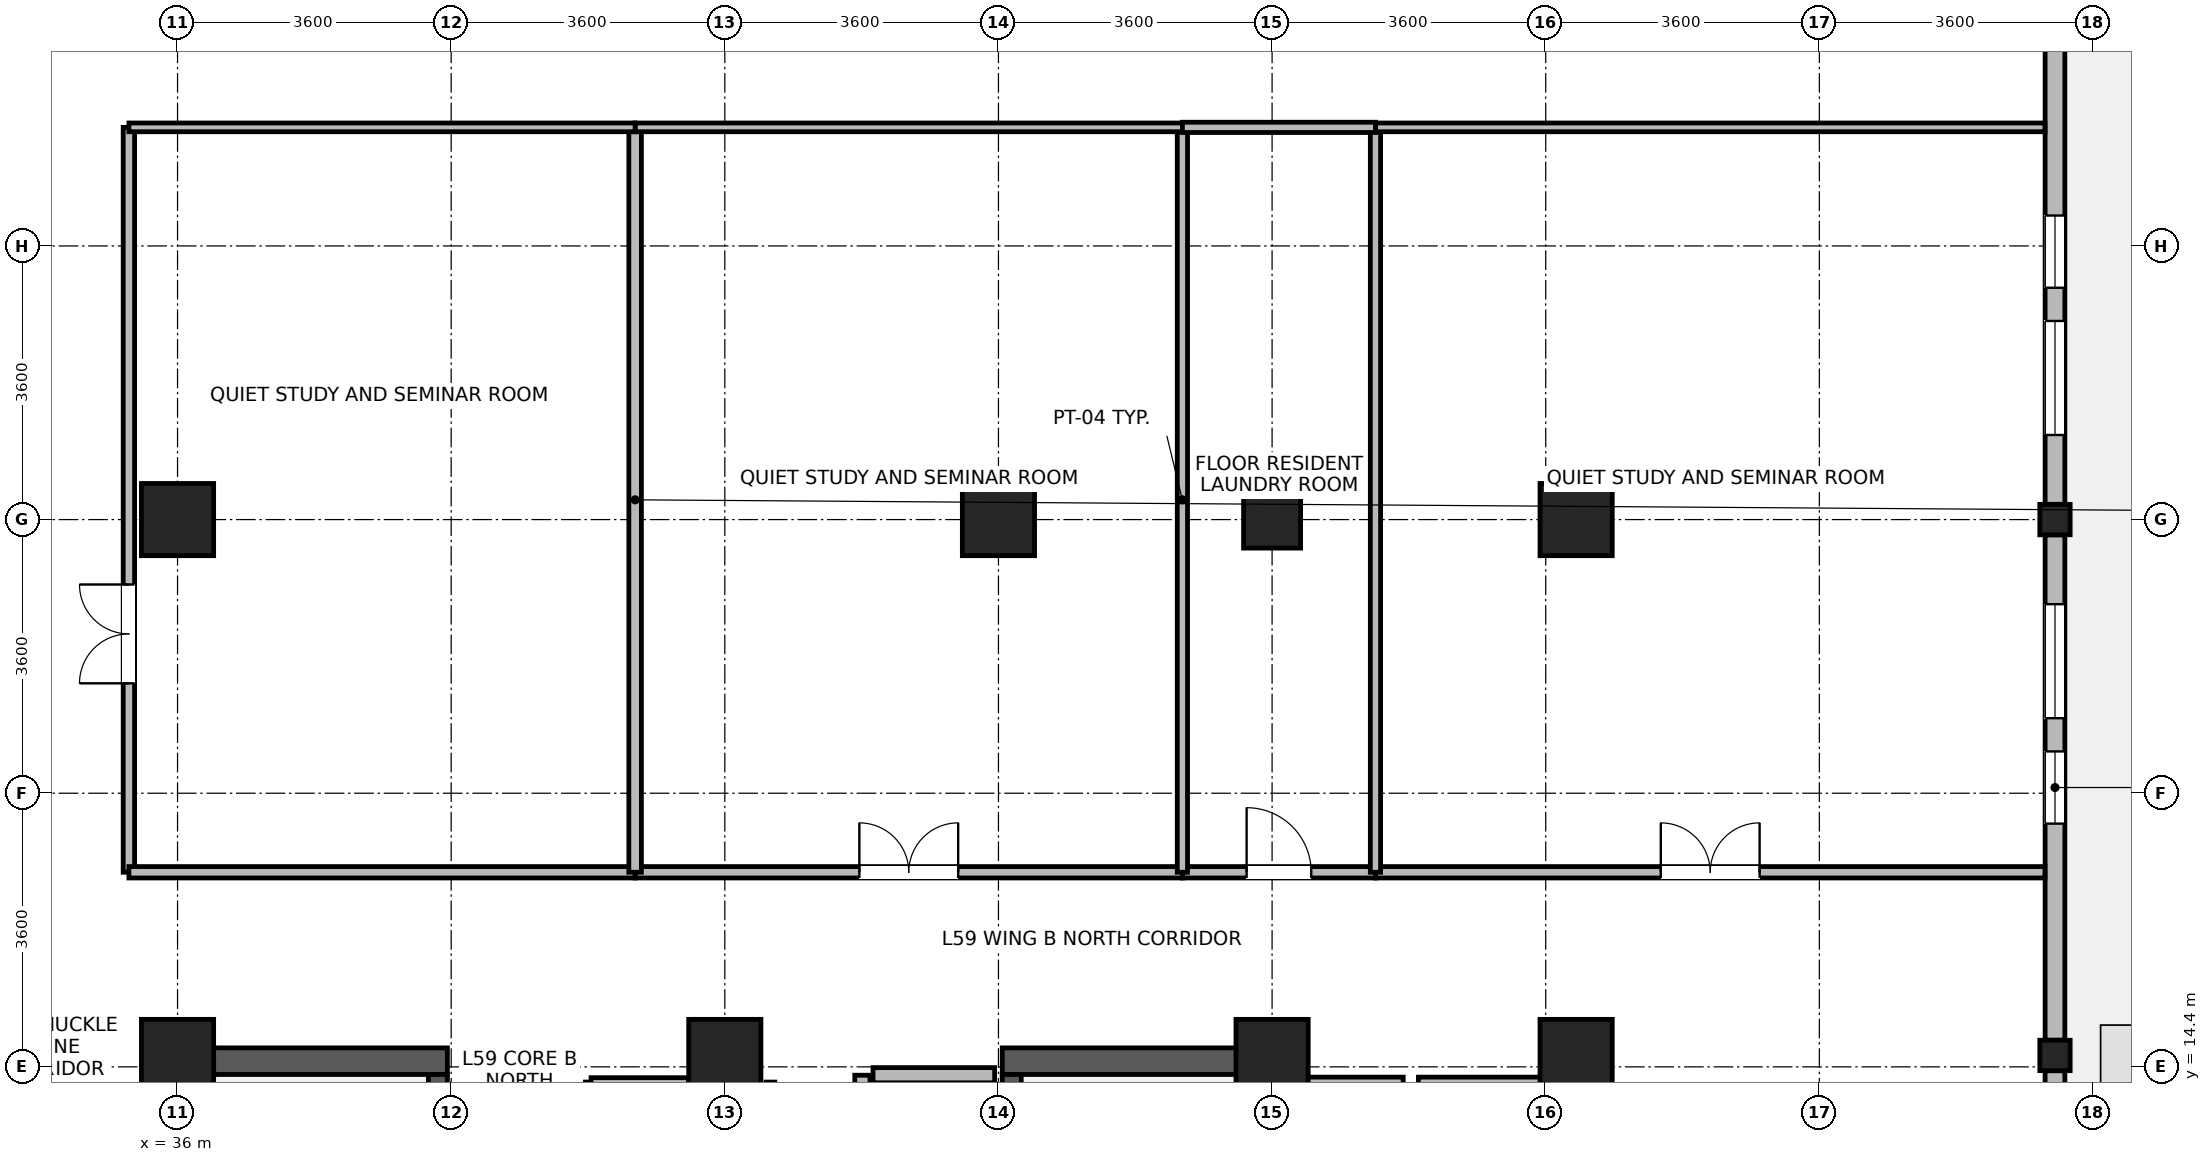
"""IFC4 building model, lengths in metres.
Left out: names, types, materials, properties, quantities, classifications, styles, units other than length and angle.
Written with IfcOpenShell. Run it as: python <this file> out.ifc"""

import sys

from ifc_helpers import new_model, si_unit, direction, frame, frame_2d, origin, origin_2d, place, context, subcontext, project, spatial, rectangle, i_section, extrude, source, transform, mapped, element, fill, save


model = new_model("IFC4")
c1 = context("Model", 3, precision=1e-05, world=origin(), true_north=direction((0.0, 1.0)))
c2 = subcontext(c1, "Body", "Model", "MODEL_VIEW")
j1 = project(units=[si_unit("LENGTHUNIT", "METRE"), si_unit("PLANEANGLEUNIT", "RADIAN")], contexts=[c1])
p1 = place(None, origin())
s1 = spatial("IfcSite", under=j1, at=p1, CompositionType="ELEMENT")
p2 = place(p1, origin())
s2 = spatial("IfcBuilding", under=s1, at=p2, CompositionType="ELEMENT")
p3 = place(p2, frame((0.0, 0.0, 231.4)))
s3 = spatial("IfcBuildingStorey", under=s2, at=p3, CompositionType="ELEMENT", Elevation=231.4)
for number, where, z_axis, x_axis in (
    (1, (36.175, 6.95, 0.0), (0.0, 0.0, 1.0), (0.0, 1.0, 0.0)),
    (2, (50.225, 6.95, 0.0), (0.0, 0.0, 1.0), (0.0, 1.0, 0.0)),
):
    element("IfcWall", number, at=place(p3, frame(where, z_axis=z_axis, x_axis=x_axis)), inside=s3, PredefinedType="SHEAR", context=c2, shape_type="SweptSolid", body=[
        extrude(rectangle(XDim=7.7, YDim=0.35, at=frame_2d((3.85, 0.0))), origin(), (0.0, 0.0, 1.0), 3.44),
    ])
for number, where, z_axis, x_axis in (
    (3, (36.35, 14.475, 0.0), (0.0, 0.0, 1.0), (1.0, 0.0, 0.0)),
    (4, (46.85, 14.475, 0.0), (0.0, 0.0, 1.0), (1.0, 0.0, 0.0)),
):
    element("IfcWall", number, at=place(p3, frame(where, z_axis=z_axis, x_axis=x_axis)), inside=s3, PredefinedType="SHEAR", context=c2, shape_type="SweptSolid", body=[
        extrude(rectangle(XDim=3.2, YDim=0.35, at=frame_2d((1.6, 0.0))), origin(), (0.0, 0.0, 1.0), 3.44),
    ])
p4 = place(p3, frame((39.425, 7.3, 0.0), z_axis=(0.0, 0.0, 1.0), x_axis=(0.0, 1.0, 0.0)))
e5 = element("IfcWall", 5, at=p4, inside=s3, PredefinedType="SHEAR", context=c2, shape_type="SweptSolid", body=[
    extrude(rectangle(XDim=7.0, YDim=0.25, at=frame_2d((3.5, 0.0))), origin(), (0.0, 0.0, 1.0), 3.44),
])
p5 = place(p4, frame((0.15, 0.0, 0.0)))
e6 = element("IfcOpeningElement", 6, at=p5, cuts=e5, PredefinedType="OPENING", context=c2, shape_type="SweptSolid", body=[
    extrude(rectangle(XDim=1.1, YDim=2.08, at=frame_2d((0.55, 1.04))), frame((0.0, 0.135, 0.0), z_axis=(0.0, -1.0, 0.0), x_axis=(1.0, 0.0, 0.0)), (0.0, 0.0, 1.0), 0.27),
])
p6 = place(p3, frame((46.975, 7.3, 0.0), z_axis=(0.0, 0.0, 1.0), x_axis=(0.0, 1.0, 0.0)))
e7 = element("IfcWall", 7, at=p6, inside=s3, PredefinedType="SHEAR", context=c2, shape_type="SweptSolid", body=[
    extrude(rectangle(XDim=7.0, YDim=0.25, at=frame_2d((3.5, 0.0))), origin(), (0.0, 0.0, 1.0), 3.44),
])
p7 = place(p6, frame((0.15, 0.0, 0.0)))
e8 = element("IfcOpeningElement", 8, at=p7, cuts=e7, PredefinedType="OPENING", context=c2, shape_type="SweptSolid", body=[
    extrude(rectangle(XDim=1.1, YDim=2.08, at=frame_2d((0.55, 1.04))), frame((0.0, 0.135, 0.0), z_axis=(0.0, -1.0, 0.0), x_axis=(1.0, 0.0, 0.0)), (0.0, 0.0, 1.0), 0.27),
])
m1 = source(origin(), c2, "Body", "SweptSolid", [
    extrude(rectangle(XDim=0.95, YDim=0.95, at=origin_2d()), origin(), (0.0, 0.0, 1.0), 3.7),
])
for number, where, z_axis, x_axis in (
    (9, (36.0, 21.6, 0.0), (0.0, 0.0, 1.0), (1.0, 0.0, 0.0)),
    (10, (46.8, 21.6, 0.0), (0.0, 0.0, 1.0), (1.0, 0.0, 0.0)),
    (11, (36.0, 14.55, 0.0), (0.0, 0.0, 1.0), (1.0, 0.0, 0.0)),
    (12, (43.2, 14.55, 0.0), (0.0, 0.0, 1.0), (1.0, 0.0, 0.0)),
    (13, (50.4, 14.55, 0.0), (0.0, 0.0, 1.0), (1.0, 0.0, 0.0)),
):
    element("IfcColumn", number, at=place(p3, frame(where, z_axis=z_axis, x_axis=x_axis)), inside=s3, PredefinedType="COLUMN", context=c2, shape_type="MappedRepresentation", body=[
        mapped(m1, transform((0.0, 0.0, 0.0), x_axis=(1.0, 0.0, 0.0), y_axis=(0.0, 1.0, 0.0), z_axis=(0.0, 0.0, 1.0), scale=1.0)),
    ])
m2 = source(origin(), c2, "Body", "SweptSolid", [
    extrude(rectangle(XDim=0.75, YDim=0.75, at=origin_2d()), origin(), (0.0, 0.0, 1.0), 3.7),
])
p8 = place(p3, frame((50.4, 21.6, 0.0), z_axis=(0.0, 0.0, 1.0), x_axis=(1.0, 0.0, 0.0)))
e14 = element("IfcColumn", 14, at=p8, inside=s3, PredefinedType="PILASTER", context=c2, shape_type="MappedRepresentation", body=[
    mapped(m2, transform((0.0, 0.0, 0.0), x_axis=(1.0, 0.0, 0.0), y_axis=(0.0, 1.0, 0.0), z_axis=(0.0, 0.0, 1.0), scale=1.0)),
])
for number, where, z_axis, x_axis in (
    (15, (54.4, 14.55, 0.0), (0.0, 0.0, 1.0), (1.0, 0.0, 0.0)),
    (16, (54.4, 21.6, 0.0), (0.0, 0.0, 1.0), (1.0, 0.0, 0.0)),
):
    element("IfcColumn", number, at=place(p3, frame(where, z_axis=z_axis, x_axis=x_axis)), inside=s3, PredefinedType="COLUMN", context=c2, shape_type="MappedRepresentation", body=[
        mapped(m1, transform((0.0, 0.0, 0.0), x_axis=(1.0, 0.0, 0.0), y_axis=(0.0, 1.0, 0.0), z_axis=(0.0, 0.0, 1.0), scale=1.0)),
    ])
m3 = source(origin(), c2, "Body", "SweptSolid", [
    extrude(i_section(OverallWidth=0.399, OverallDepth=0.4, WebThickness=0.017, FlangeThickness=0.023, FilletRadius=0.015, at=origin_2d()), origin(), (0.0, 0.0, 1.0), 3.7),
])
for number, where, z_axis, x_axis in (
    (17, (60.7, 14.55, 0.0), (0.0, 0.0, 1.0), (1.0, 0.0, 0.0)),
    (18, (60.7, 21.6, 0.0), (0.0, 0.0, 1.0), (1.0, 0.0, 0.0)),
):
    element("IfcColumn", number, at=place(p3, frame(where, z_axis=z_axis, x_axis=x_axis)), inside=s3, PredefinedType="COLUMN", context=c2, shape_type="MappedRepresentation", body=[
        mapped(m3, transform((0.0, 0.0, 0.0), x_axis=(1.0, 0.0, 0.0), y_axis=(0.0, 1.0, 0.0), z_axis=(0.0, 0.0, 1.0), scale=1.0)),
    ])
p9 = place(p3, frame((60.7, 14.349, 0.0), z_axis=(0.0, 0.0, 1.0), x_axis=(0.0, -1.0, 0.0)))
e19 = element("IfcWall", 19, at=p9, inside=s3, PredefinedType="STANDARD", context=c2, shape_type="SweptSolid", body=[
    extrude(rectangle(XDim=5.079, YDim=0.26, at=frame_2d((2.54, 0.0))), origin(), (0.0, 0.0, 1.0), 3.02),
])
p10 = place(p9, frame((1.79, 0.0, 0.0)))
e20 = element("IfcOpeningElement", 20, at=p10, cuts=e19, PredefinedType="OPENING", context=c2, shape_type="SweptSolid", body=[
    extrude(rectangle(XDim=1.5, YDim=2.15, at=frame_2d((0.75, 1.075))), frame((0.0, 0.14, 0.0), z_axis=(0.0, -1.0, 0.0), x_axis=(1.0, 0.0, 0.0)), (0.0, 0.0, 1.0), 0.28),
])
p11 = place(p3, frame((60.7, 21.399, 0.0), z_axis=(0.0, 0.0, 1.0), x_axis=(0.0, -1.0, 0.0)))
e21 = element("IfcWall", 21, at=p11, inside=s3, PredefinedType="STANDARD", context=c2, shape_type="SweptSolid", body=[
    extrude(rectangle(XDim=6.648, YDim=0.26, at=frame_2d((3.324, 0.0))), origin(), (0.0, 0.0, 1.0), 3.02),
])
p12 = place(p11, frame((0.912, 0.0, 0.85)))
e22 = element("IfcOpeningElement", 22, at=p12, cuts=e21, PredefinedType="OPENING", context=c2, shape_type="SweptSolid", body=[
    extrude(rectangle(XDim=1.5, YDim=1.85, at=frame_2d((0.75, 0.925))), frame((0.0, 0.14, 0.0), z_axis=(0.0, -1.0, 0.0), x_axis=(1.0, 0.0, 0.0)), (0.0, 0.0, 1.0), 0.28),
])
p13 = place(p11, frame((2.849, 0.0, 0.85)))
e23 = element("IfcOpeningElement", 23, at=p13, cuts=e21, PredefinedType="OPENING", context=c2, shape_type="SweptSolid", body=[
    extrude(rectangle(XDim=0.95, YDim=1.75, at=frame_2d((0.475, 0.875))), frame((0.0, 0.14, 0.0), z_axis=(0.0, -1.0, 0.0), x_axis=(1.0, 0.0, 0.0)), (0.0, 0.0, 1.0), 0.28),
])
p14 = place(p3, frame((60.7, 28.449, 0.0), z_axis=(0.0, 0.0, 1.0), x_axis=(0.0, -1.0, 0.0)))
e24 = element("IfcWall", 24, at=p14, inside=s3, PredefinedType="STANDARD", context=c2, shape_type="SweptSolid", body=[
    extrude(rectangle(XDim=6.648, YDim=0.26, at=frame_2d((3.324, 0.0))), origin(), (0.0, 0.0, 1.0), 3.02),
])
p15 = place(p14, frame((4.236, 0.0, 0.85)))
e25 = element("IfcOpeningElement", 25, at=p15, cuts=e24, PredefinedType="OPENING", context=c2, shape_type="SweptSolid", body=[
    extrude(rectangle(XDim=1.5, YDim=1.85, at=frame_2d((0.75, 0.925))), frame((0.0, 0.14, 0.0), z_axis=(0.0, -1.0, 0.0), x_axis=(1.0, 0.0, 0.0)), (0.0, 0.0, 1.0), 0.28),
])
p16 = place(p14, frame((2.849, 0.0, 0.85)))
e26 = element("IfcOpeningElement", 26, at=p16, cuts=e24, PredefinedType="OPENING", context=c2, shape_type="SweptSolid", body=[
    extrude(rectangle(XDim=0.95, YDim=1.75, at=frame_2d((0.475, 0.875))), frame((0.0, 0.14, 0.0), z_axis=(0.0, -1.0, 0.0), x_axis=(1.0, 0.0, 0.0)), (0.0, 0.0, 1.0), 0.28),
])
p17 = place(p3, frame((50.475, 14.165, 0.0), z_axis=(0.0, 0.0, 1.0), x_axis=(1.0, 0.0, 0.0)))
e27 = element("IfcWall", 27, at=p17, inside=s3, PredefinedType="PARTITIONING", context=c2, shape_type="SweptSolid", body=[
    extrude(rectangle(XDim=1.65, YDim=0.2, at=frame_2d((0.825, 0.0))), origin(), (0.0, 0.0, 1.0), 3.42),
])
p18 = place(p3, frame((52.325, 14.165, 0.0), z_axis=(0.0, 0.0, 1.0), x_axis=(1.0, 0.0, 0.0)))
e28 = element("IfcWall", 28, at=p18, inside=s3, PredefinedType="PARTITIONING", context=c2, shape_type="SweptSolid", body=[
    extrude(rectangle(XDim=1.65, YDim=0.2, at=frame_2d((0.825, 0.0))), origin(), (0.0, 0.0, 1.0), 3.42),
])
p19 = place(p3, frame((45.15, 14.29, 0.0), z_axis=(0.0, 0.0, 1.0), x_axis=(1.0, 0.0, 0.0)))
e29 = element("IfcWall", 29, at=p19, inside=s3, PredefinedType="PARTITIONING", context=c2, shape_type="SweptSolid", body=[
    extrude(rectangle(XDim=1.6, YDim=0.2, at=frame_2d((0.8, 0.0))), origin(), (0.0, 0.0, 1.0), 2.52),
])
p20 = place(p3, frame((45.01, 11.61, 0.0), z_axis=(0.0, 0.0, 1.0), x_axis=(0.0, 1.0, 0.0)))
e30 = element("IfcWall", 30, at=p20, inside=s3, PredefinedType="PARTITIONING", context=c2, shape_type="SweptSolid", body=[
    extrude(rectangle(XDim=2.68, YDim=0.2, at=frame_2d((1.34, 0.0))), origin(), (0.0, 0.0, 1.0), 3.42),
])
p21 = place(p3, frame((35.36, 16.96, 0.0), z_axis=(0.0, 0.0, 1.0), x_axis=(0.0, 1.0, 0.0)))
e31 = element("IfcWall", 31, at=p21, inside=s3, PredefinedType="PARTITIONING", context=c2, shape_type="SweptSolid", body=[
    extrude(rectangle(XDim=9.8, YDim=0.15, at=frame_2d((4.9, 0.0))), origin(), (0.0, 0.0, 1.0), 3.42),
])
p22 = place(p21, frame((2.486, 0.0, 0.0)))
e32 = element("IfcOpeningElement", 32, at=p22, cuts=e31, PredefinedType="OPENING", context=c2, shape_type="SweptSolid", body=[
    extrude(rectangle(XDim=1.3, YDim=2.12, at=frame_2d((0.65, 1.06))), frame((0.0, 0.085, 0.0), z_axis=(0.0, -1.0, 0.0), x_axis=(1.0, 0.0, 0.0)), (0.0, 0.0, 1.0), 0.17),
])
p23 = place(p3, frame((51.76, 16.96, 0.0), z_axis=(0.0, 0.0, 1.0), x_axis=(1.0, 0.0, 0.0)))
e33 = element("IfcWall", 33, at=p23, inside=s3, PredefinedType="PARTITIONING", context=c2, shape_type="SweptSolid", body=[
    extrude(rectangle(XDim=8.808, YDim=0.15, at=frame_2d((4.404, 0.0))), origin(), (0.0, 0.0, 1.0), 3.42),
])
p24 = place(p23, frame((3.754, 0.0, 0.0)))
e34 = element("IfcOpeningElement", 34, at=p24, cuts=e33, PredefinedType="OPENING", context=c2, shape_type="SweptSolid", body=[
    extrude(rectangle(XDim=1.3, YDim=2.12, at=frame_2d((0.65, 1.06))), frame((0.0, 0.085, 0.0), z_axis=(0.0, -1.0, 0.0), x_axis=(1.0, 0.0, 0.0)), (0.0, 0.0, 1.0), 0.17),
])
p25 = place(p3, frame((42.02, 16.96, 0.0), z_axis=(0.0, 0.0, 1.0), x_axis=(1.0, 0.0, 0.0)))
e35 = element("IfcWall", 35, at=p25, inside=s3, PredefinedType="PARTITIONING", context=c2, shape_type="SweptSolid", body=[
    extrude(rectangle(XDim=7.2, YDim=0.15, at=frame_2d((3.6, 0.0))), origin(), (0.0, 0.0, 1.0), 3.42),
])
p26 = place(p25, frame((2.95, 0.0, 0.0)))
e36 = element("IfcOpeningElement", 36, at=p26, cuts=e35, PredefinedType="OPENING", context=c2, shape_type="SweptSolid", body=[
    extrude(rectangle(XDim=1.3, YDim=2.12, at=frame_2d((0.65, 1.06))), frame((0.0, 0.085, 0.0), z_axis=(0.0, -1.0, 0.0), x_axis=(1.0, 0.0, 0.0)), (0.0, 0.0, 1.0), 0.17),
])
p27 = place(p3, frame((35.36, 16.96, 0.0), z_axis=(0.0, 0.0, 1.0), x_axis=(1.0, 0.0, 0.0)))
e37 = element("IfcWall", 37, at=p27, inside=s3, PredefinedType="PARTITIONING", context=c2, shape_type="SweptSolid", body=[
    extrude(rectangle(XDim=6.66, YDim=0.15, at=frame_2d((3.33, 0.0))), origin(), (0.0, 0.0, 1.0), 3.42),
])
p28 = place(p3, frame((49.22, 16.96, 0.0), z_axis=(0.0, 0.0, 1.0), x_axis=(1.0, 0.0, 0.0)))
e38 = element("IfcWall", 38, at=p28, inside=s3, PredefinedType="PARTITIONING", context=c2, shape_type="SweptSolid", body=[
    extrude(rectangle(XDim=2.54, YDim=0.15, at=frame_2d((1.27, 0.0))), origin(), (0.0, 0.0, 1.0), 3.42),
])
p29 = place(p28, frame((0.845, 0.0, 0.0)))
e39 = element("IfcOpeningElement", 39, at=p29, cuts=e38, PredefinedType="OPENING", context=c2, shape_type="SweptSolid", body=[
    extrude(rectangle(XDim=0.85, YDim=2.04, at=frame_2d((0.425, 1.02))), frame((0.0, 0.085, 0.0), z_axis=(0.0, -1.0, 0.0), x_axis=(1.0, 0.0, 0.0)), (0.0, 0.0, 1.0), 0.17),
])
p30 = place(p3, frame((42.02, 16.96, 0.0), z_axis=(0.0, 0.0, 1.0), x_axis=(0.0, 1.0, 0.0)))
e40 = element("IfcWall", 40, at=p30, inside=s3, PredefinedType="PARTITIONING", context=c2, shape_type="SweptSolid", body=[
    extrude(rectangle(XDim=9.8, YDim=0.165, at=frame_2d((4.9, 0.0))), origin(), (0.0, 0.0, 1.0), 3.42),
])
for number, where, z_axis, x_axis in (
    (41, (49.22, 16.96, 0.0), (0.0, 0.0, 1.0), (0.0, 1.0, 0.0)),
    (42, (51.76, 16.96, 0.0), (0.0, 0.0, 1.0), (0.0, 1.0, 0.0)),
):
    element("IfcWall", number, at=place(p3, frame(where, z_axis=z_axis, x_axis=x_axis)), inside=s3, PredefinedType="PARTITIONING", context=c2, shape_type="SweptSolid", body=[
        extrude(rectangle(XDim=9.8, YDim=0.135, at=frame_2d((4.9, 0.0))), origin(), (0.0, 0.0, 1.0), 3.42),
    ])
p31 = place(p3, frame((51.76, 26.76, 0.0), z_axis=(0.0, 0.0, 1.0), x_axis=(1.0, 0.0, 0.0)))
e43 = element("IfcWall", 43, at=p31, inside=s3, PredefinedType="PARTITIONING", context=c2, shape_type="SweptSolid", body=[
    extrude(rectangle(XDim=8.808, YDim=0.115, at=frame_2d((4.404, 0.0))), origin(), (0.0, 0.0, 1.0), 3.42),
])
p32 = place(p3, frame((42.02, 26.76, 0.0), z_axis=(0.0, 0.0, 1.0), x_axis=(1.0, 0.0, 0.0)))
e44 = element("IfcWall", 44, at=p32, inside=s3, PredefinedType="PARTITIONING", context=c2, shape_type="SweptSolid", body=[
    extrude(rectangle(XDim=7.2, YDim=0.115, at=frame_2d((3.6, 0.0))), origin(), (0.0, 0.0, 1.0), 3.42),
])
p33 = place(p3, frame((35.36, 26.76, 0.0), z_axis=(0.0, 0.0, 1.0), x_axis=(1.0, 0.0, 0.0)))
e45 = element("IfcWall", 45, at=p33, inside=s3, PredefinedType="PARTITIONING", context=c2, shape_type="SweptSolid", body=[
    extrude(rectangle(XDim=6.66, YDim=0.115, at=frame_2d((3.33, 0.0))), origin(), (0.0, 0.0, 1.0), 3.42),
])
p34 = place(p3, frame((49.22, 26.76, 0.0), z_axis=(0.0, 0.0, 1.0), x_axis=(1.0, 0.0, 0.0)))
e46 = element("IfcWall", 46, at=p34, inside=s3, PredefinedType="PARTITIONING", context=c2, shape_type="SweptSolid", body=[
    extrude(rectangle(XDim=2.54, YDim=0.135, at=frame_2d((1.27, 0.0))), origin(), (0.0, 0.0, 1.0), 3.42),
])
p35 = place(p3, frame((41.44, 14.2, 0.0), z_axis=(0.0, 0.0, 1.0), x_axis=(1.0, 0.0, 0.0)))
e47 = element("IfcWall", 47, at=p35, inside=s3, PredefinedType="PARTITIONING", context=c2, shape_type="SweptSolid", body=[
    extrude(rectangle(XDim=1.285, YDim=0.115, at=frame_2d((0.643, 0.0))), origin(), (0.0, 0.0, 1.0), 2.52),
])
p36 = place(p12, origin())
e48 = element("IfcWindow", 48, at=p36, inside=s3, PartitioningType="SINGLE_PANEL", PredefinedType="WINDOW", context=c2, shape_type="SweptSolid", body=[
    extrude(rectangle(XDim=1.5, YDim=1.85, at=frame_2d((0.75, 0.925))), frame((0.0, 0.03, 0.0), z_axis=(0.0, -1.0, 0.0), x_axis=(1.0, 0.0, 0.0)), (0.0, 0.0, 1.0), 0.06),
])
fill(e22, e48)
p37 = place(p13, origin())
e49 = element("IfcWindow", 49, at=p37, inside=s3, PartitioningType="SINGLE_PANEL", PredefinedType="WINDOW", context=c2, shape_type="SweptSolid", body=[
    extrude(rectangle(XDim=0.95, YDim=1.75, at=frame_2d((0.475, 0.875))), frame((0.0, 0.03, 0.0), z_axis=(0.0, -1.0, 0.0), x_axis=(1.0, 0.0, 0.0)), (0.0, 0.0, 1.0), 0.06),
])
fill(e23, e49)
p38 = place(p15, origin())
e50 = element("IfcWindow", 50, at=p38, inside=s3, PartitioningType="SINGLE_PANEL", PredefinedType="WINDOW", context=c2, shape_type="SweptSolid", body=[
    extrude(rectangle(XDim=1.5, YDim=1.85, at=frame_2d((0.75, 0.925))), frame((0.0, 0.03, 0.0), z_axis=(0.0, -1.0, 0.0), x_axis=(1.0, 0.0, 0.0)), (0.0, 0.0, 1.0), 0.06),
])
fill(e25, e50)
p39 = place(p16, origin())
e51 = element("IfcWindow", 51, at=p39, inside=s3, PartitioningType="SINGLE_PANEL", PredefinedType="WINDOW", context=c2, shape_type="SweptSolid", body=[
    extrude(rectangle(XDim=0.95, YDim=1.75, at=frame_2d((0.475, 0.875))), frame((0.0, 0.03, 0.0), z_axis=(0.0, -1.0, 0.0), x_axis=(1.0, 0.0, 0.0)), (0.0, 0.0, 1.0), 0.06),
])
fill(e26, e51)
p40 = place(p22, origin())
e52 = element("IfcDoor", 52, at=p40, inside=s3, OperationType="DOUBLE_DOOR_SINGLE_SWING", PredefinedType="DOOR", context=c2, shape_type="SweptSolid", body=[
    extrude(rectangle(XDim=1.3, YDim=2.12, at=frame_2d((0.65, 1.06))), frame((0.0, 0.025, 0.0), z_axis=(0.0, -1.0, 0.0), x_axis=(1.0, 0.0, 0.0)), (0.0, 0.0, 1.0), 0.05),
])
fill(e32, e52)
p41 = place(p24, origin())
e53 = element("IfcDoor", 53, at=p41, inside=s3, OperationType="DOUBLE_DOOR_SINGLE_SWING", PredefinedType="DOOR", context=c2, shape_type="SweptSolid", body=[
    extrude(rectangle(XDim=1.3, YDim=2.12, at=frame_2d((0.65, 1.06))), frame((0.0, 0.025, 0.0), z_axis=(0.0, -1.0, 0.0), x_axis=(1.0, 0.0, 0.0)), (0.0, 0.0, 1.0), 0.05),
])
fill(e34, e53)
p42 = place(p26, origin())
e54 = element("IfcDoor", 54, at=p42, inside=s3, OperationType="DOUBLE_DOOR_SINGLE_SWING", PredefinedType="DOOR", context=c2, shape_type="SweptSolid", body=[
    extrude(rectangle(XDim=1.3, YDim=2.12, at=frame_2d((0.65, 1.06))), frame((0.0, 0.025, 0.0), z_axis=(0.0, -1.0, 0.0), x_axis=(1.0, 0.0, 0.0)), (0.0, 0.0, 1.0), 0.05),
])
fill(e36, e54)
p43 = place(p29, origin())
e55 = element("IfcDoor", 55, at=p43, inside=s3, OperationType="SINGLE_SWING_LEFT", PredefinedType="DOOR", context=c2, shape_type="SweptSolid", body=[
    extrude(rectangle(XDim=0.85, YDim=2.04, at=frame_2d((0.425, 1.02))), frame((0.0, 0.025, 0.0), z_axis=(0.0, -1.0, 0.0), x_axis=(1.0, 0.0, 0.0)), (0.0, 0.0, 1.0), 0.05),
])
fill(e39, e55)
save(model, sys.argv[1])
